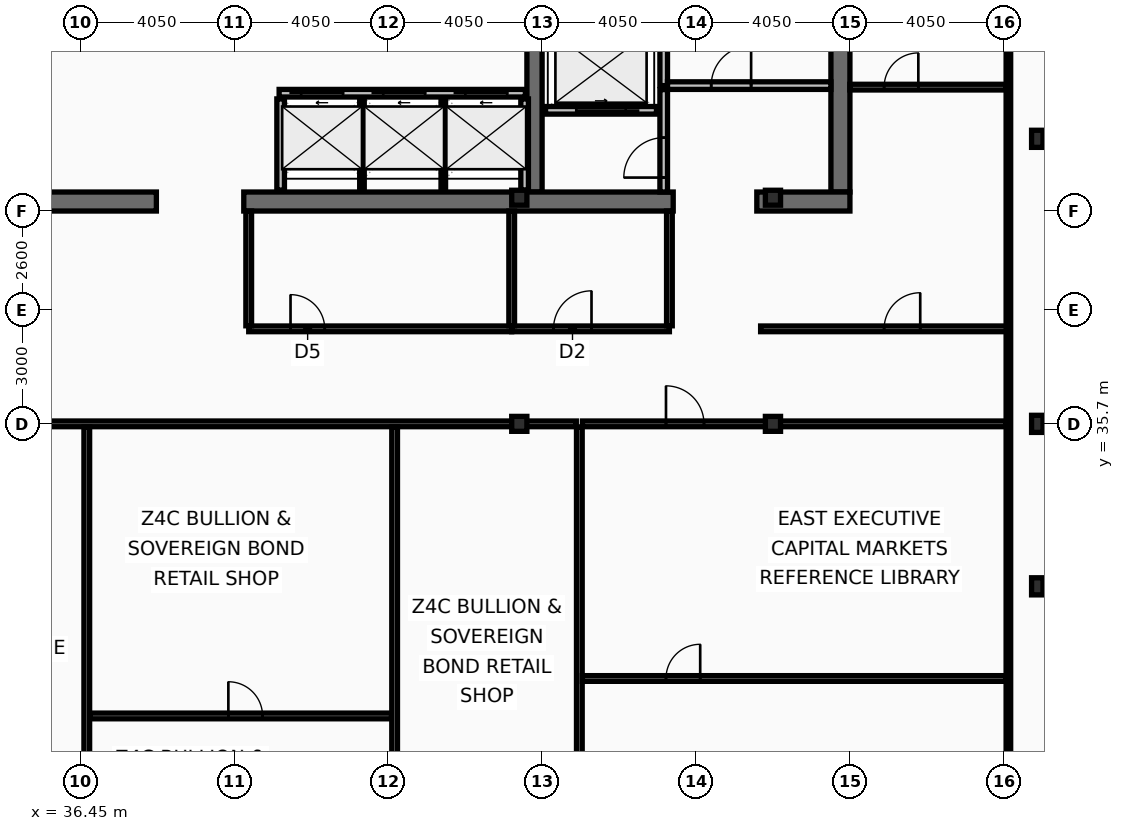
"""IFC4 building model, lengths in metres.
Left out: names, types, materials, properties, quantities, classifications, styles, units other than length and angle.
Written with IfcOpenShell. Run it as: python <this file> out.ifc"""

import sys

from ifc_helpers import new_model, si_unit, direction, frame, frame_2d, origin, origin_2d, place, context, subcontext, project, spatial, rectangle, i_section, extrude, element, fill, save


model = new_model("IFC4")
c1 = context("Model", 3, precision=1e-05, world=origin(), true_north=direction((0.0, 1.0)))
c2 = subcontext(c1, "Body", "Model", "MODEL_VIEW")
j1 = project(units=[si_unit("LENGTHUNIT", "METRE"), si_unit("PLANEANGLEUNIT", "RADIAN")], contexts=[c1])
p1 = place(None, origin())
s1 = spatial("IfcSite", under=j1, at=p1, CompositionType="ELEMENT")
p2 = place(p1, origin())
s2 = spatial("IfcBuilding", under=s1, at=p2, CompositionType="ELEMENT")
p3 = place(p2, frame((0.0, 0.0, 302.2)))
s3 = spatial("IfcBuildingStorey", under=s2, at=p3, CompositionType="ELEMENT", Elevation=302.2)
p4 = place(p3, frame((56.45, 53.2, 0.0), z_axis=(0.0, 0.0, 1.0), x_axis=(0.0, -1.0, 0.0)))
e1 = element("IfcWall", 1, at=p4, inside=s3, PredefinedType="SHEAR", context=c2, shape_type="SweptSolid", body=[
    extrude(rectangle(XDim=11.4, YDim=0.5, at=frame_2d((5.7, 0.0))), origin(), (0.0, 0.0, 1.0), 3.38),
])
p5 = place(p3, frame((48.4, 41.8, 0.0), z_axis=(0.0, 0.0, 1.0), x_axis=(0.0, 1.0, 0.0)))
e2 = element("IfcWall", 2, at=p5, inside=s3, PredefinedType="SHEAR", context=c2, shape_type="SweptSolid", body=[
    extrude(rectangle(XDim=11.4, YDim=0.4, at=frame_2d((5.7, 0.0))), origin(), (0.0, 0.0, 1.0), 3.38),
])
p6 = place(p3, frame((38.45, 41.55, 0.0), z_axis=(0.0, 0.0, 1.0), x_axis=(-1.0, 0.0, 0.0)))
e3 = element("IfcWall", 3, at=p6, inside=s3, PredefinedType="SHEAR", context=c2, shape_type="SweptSolid", body=[
    extrude(rectangle(XDim=3.75, YDim=0.5, at=frame_2d((1.875, 0.0))), origin(), (0.0, 0.0, 1.0), 3.38),
])
p7 = place(p3, frame((52.05, 41.55, 0.0), z_axis=(0.0, 0.0, 1.0), x_axis=(-1.0, 0.0, 0.0)))
e4 = element("IfcWall", 4, at=p7, inside=s3, PredefinedType="SHEAR", context=c2, shape_type="SweptSolid", body=[
    extrude(rectangle(XDim=11.3, YDim=0.5, at=frame_2d((5.65, 0.0))), origin(), (0.0, 0.0, 1.0), 3.38),
])
p8 = place(p3, frame((56.7, 41.55, 0.0), z_axis=(0.0, 0.0, 1.0), x_axis=(-1.0, 0.0, 0.0)))
e5 = element("IfcWall", 5, at=p8, inside=s3, PredefinedType="SHEAR", context=c2, shape_type="SweptSolid", body=[
    extrude(rectangle(XDim=2.45, YDim=0.5, at=frame_2d((1.225, 0.0))), origin(), (0.0, 0.0, 1.0), 3.38),
])
for number, where, z_axis, x_axis in (
    (6, (61.63, 31.425, 0.0), (0.0, 0.0, 1.0), (1.0, 0.0, 0.0)),
    (7, (61.63, 35.7, 0.0), (0.0, 0.0, 1.0), (1.0, 0.0, 0.0)),
    (8, (61.63, 43.2, 0.0), (0.0, 0.0, 1.0), (1.0, 0.0, 0.0)),
):
    element("IfcColumn", number, at=place(p3, frame(where, z_axis=z_axis, x_axis=x_axis)), inside=s3, PredefinedType="COLUMN", context=c2, shape_type="SweptSolid", body=[
        extrude(i_section(OverallWidth=0.3, OverallDepth=0.45, WebThickness=0.014, FlangeThickness=0.026, at=origin_2d()), origin(), (0.0, 0.0, 1.0), 3.6),
    ])
for number, where, z_axis, x_axis in (
    (9, (48.0, 35.7, 0.0), (0.0, 0.0, 1.0), (1.0, 0.0, 0.0)),
    (10, (48.0, 41.65, 0.0), (0.0, 0.0, 1.0), (1.0, 0.0, 0.0)),
    (11, (54.675, 35.7, 0.0), (0.0, 0.0, 1.0), (1.0, 0.0, 0.0)),
    (12, (54.675, 41.65, 0.0), (0.0, 0.0, 1.0), (1.0, 0.0, 0.0)),
):
    element("IfcColumn", number, at=place(p3, frame(where, z_axis=z_axis, x_axis=x_axis)), inside=s3, PredefinedType="COLUMN", context=c2, shape_type="SweptSolid", body=[
        extrude(i_section(OverallWidth=0.399, OverallDepth=0.393, WebThickness=0.023, FlangeThickness=0.037, at=origin_2d()), origin(), (0.0, 0.0, 1.0), 3.6),
    ])
p9 = place(p3, frame((41.68, 44.4, 0.0), z_axis=(0.0, 0.0, 1.0), x_axis=(1.0, 0.0, 0.0)))
e13 = element("IfcWall", 13, at=p9, inside=s3, PredefinedType="PARTITIONING", context=c2, shape_type="SweptSolid", body=[
    extrude(rectangle(XDim=6.48, YDim=0.2, at=frame_2d((3.24, 0.0))), origin(), (0.0, 0.0, 1.0), 3.38),
])
p10 = place(p9, frame((0.58, 0.0, 0.0)))
e14 = element("IfcOpeningElement", 14, at=p10, cuts=e13, PredefinedType="OPENING", context=c2, shape_type="SweptSolid", body=[
    extrude(rectangle(XDim=1.1, YDim=2.18, at=frame_2d((0.55, 1.09))), frame((0.0, 0.11, 0.0), z_axis=(0.0, -1.0, 0.0), x_axis=(1.0, 0.0, 0.0)), (0.0, 0.0, 1.0), 0.22),
])
p11 = place(p9, frame((2.74, 0.0, 0.0)))
e15 = element("IfcOpeningElement", 15, at=p11, cuts=e13, PredefinedType="OPENING", context=c2, shape_type="SweptSolid", body=[
    extrude(rectangle(XDim=1.1, YDim=2.18, at=frame_2d((0.55, 1.09))), frame((0.0, 0.11, 0.0), z_axis=(0.0, -1.0, 0.0), x_axis=(1.0, 0.0, 0.0)), (0.0, 0.0, 1.0), 0.22),
])
p12 = place(p9, frame((4.9, 0.0, 0.0)))
e16 = element("IfcOpeningElement", 16, at=p12, cuts=e13, PredefinedType="OPENING", context=c2, shape_type="SweptSolid", body=[
    extrude(rectangle(XDim=1.1, YDim=2.18, at=frame_2d((0.55, 1.09))), frame((0.0, 0.11, 0.0), z_axis=(0.0, -1.0, 0.0), x_axis=(1.0, 0.0, 0.0)), (0.0, 0.0, 1.0), 0.22),
])
p13 = place(p3, frame((51.61, 43.95, 0.0), z_axis=(0.0, 0.0, 1.0), x_axis=(-1.0, 0.0, 0.0)))
e17 = element("IfcWall", 17, at=p13, inside=s3, PredefinedType="PARTITIONING", context=c2, shape_type="SweptSolid", body=[
    extrude(rectangle(XDim=2.92, YDim=0.2, at=frame_2d((1.46, 0.0))), origin(), (0.0, 0.0, 1.0), 3.38),
])
p14 = place(p13, frame((0.81, 0.0, 0.0)))
e18 = element("IfcOpeningElement", 18, at=p14, cuts=e17, PredefinedType="OPENING", context=c2, shape_type="SweptSolid", body=[
    extrude(rectangle(XDim=1.3, YDim=2.18, at=frame_2d((0.65, 1.09))), frame((0.0, 0.11, 0.0), z_axis=(0.0, -1.0, 0.0), x_axis=(1.0, 0.0, 0.0)), (0.0, 0.0, 1.0), 0.22),
])
p15 = place(p3, frame((51.8, 44.6, 0.0), z_axis=(0.0, 0.0, 1.0), x_axis=(0.0, 1.0, 0.0)))
e19 = element("IfcWall", 19, at=p15, inside=s3, PredefinedType="PARTITIONING", context=c2, shape_type="SweptSolid", body=[
    extrude(rectangle(XDim=4.3, YDim=0.2, at=frame_2d((2.15, 0.0))), origin(), (0.0, 0.0, 1.0), 3.38),
])
p16 = place(p3, frame((51.9, 44.6, 0.0), z_axis=(0.0, 0.0, 1.0), x_axis=(1.0, 0.0, 0.0)))
e20 = element("IfcWall", 20, at=p16, inside=s3, PredefinedType="PARTITIONING", context=c2, shape_type="SweptSolid", body=[
    extrude(rectangle(XDim=4.3, YDim=0.2, at=frame_2d((2.15, 0.0))), origin(), (0.0, 0.0, 1.0), 3.38),
])
p17 = place(p16, frame((1.15, 0.0, 0.0)))
e21 = element("IfcOpeningElement", 21, at=p17, cuts=e20, PredefinedType="OPENING", context=c2, shape_type="SweptSolid", body=[
    extrude(rectangle(XDim=1.05, YDim=2.15, at=frame_2d((0.525, 1.075))), frame((0.0, 0.11, 0.0), z_axis=(0.0, -1.0, 0.0), x_axis=(1.0, 0.0, 0.0)), (0.0, 0.0, 1.0), 0.22),
])
p18 = place(p3, frame((51.8, 41.8, 0.0), z_axis=(0.0, 0.0, 1.0), x_axis=(0.0, 1.0, 0.0)))
e22 = element("IfcWall", 22, at=p18, inside=s3, PredefinedType="PARTITIONING", context=c2, shape_type="SweptSolid", body=[
    extrude(rectangle(XDim=2.695, YDim=0.2, at=frame_2d((1.348, 0.0))), origin(), (0.0, 0.0, 1.0), 3.38),
])
p19 = place(p18, frame((0.38, 0.0, 0.0)))
e23 = element("IfcOpeningElement", 23, at=p19, cuts=e22, PredefinedType="OPENING", context=c2, shape_type="SweptSolid", body=[
    extrude(rectangle(XDim=1.05, YDim=2.15, at=frame_2d((0.525, 1.075))), frame((0.0, 0.11, 0.0), z_axis=(0.0, -1.0, 0.0), x_axis=(1.0, 0.0, 0.0)), (0.0, 0.0, 1.0), 0.22),
])
for number, where, z_axis, x_axis in (
    (24, (41.72, 41.85, 0.0), (0.0, 0.0, 1.0), (0.0, 1.0, 0.0)),
    (25, (48.14, 41.85, 0.0), (0.0, 0.0, 1.0), (0.0, 1.0, 0.0)),
):
    element("IfcWall", number, at=place(p3, frame(where, z_axis=z_axis, x_axis=x_axis)), inside=s3, PredefinedType="PARTITIONING", context=c2, shape_type="SweptSolid", body=[
        extrude(rectangle(XDim=2.4, YDim=0.2, at=frame_2d((1.2, 0.0))), origin(), (0.0, 0.0, 1.0), 3.38),
    ])
for number, where, z_axis, x_axis in (
    (26, (43.86, 41.85, 0.0), (0.0, 0.0, 1.0), (0.0, 1.0, 0.0)),
    (27, (46.0, 41.85, 0.0), (0.0, 0.0, 1.0), (0.0, 1.0, 0.0)),
):
    element("IfcWall", number, at=place(p3, frame(where, z_axis=z_axis, x_axis=x_axis)), inside=s3, PredefinedType="PARTITIONING", context=c2, shape_type="SweptSolid", body=[
        extrude(rectangle(XDim=2.4, YDim=0.12, at=frame_2d((1.2, 0.0))), origin(), (0.0, 0.0, 1.0), 3.38),
    ])
p20 = place(p3, frame((40.88, 38.2, 0.0), z_axis=(0.0, 0.0, 1.0), x_axis=(1.0, 0.0, 0.0)))
e28 = element("IfcWall", 28, at=p20, inside=s3, PredefinedType="PARTITIONING", context=c2, shape_type="SweptSolid", body=[
    extrude(rectangle(XDim=6.92, YDim=0.15, at=frame_2d((3.46, 0.0))), origin(), (0.0, 0.0, 1.0), 2.72),
])
p21 = place(p20, frame((1.1, 0.0, 0.0)))
e29 = element("IfcOpeningElement", 29, at=p21, cuts=e28, PredefinedType="OPENING", context=c2, shape_type="SweptSolid", body=[
    extrude(rectangle(XDim=0.9, YDim=2.05, at=frame_2d((0.45, 1.025))), frame((0.0, 0.085, 0.0), z_axis=(0.0, -1.0, 0.0), x_axis=(1.0, 0.0, 0.0)), (0.0, 0.0, 1.0), 0.17),
])
p22 = place(p3, frame((47.8, 38.2, 0.0), z_axis=(0.0, 0.0, 1.0), x_axis=(1.0, 0.0, 0.0)))
e30 = element("IfcWall", 30, at=p22, inside=s3, PredefinedType="PARTITIONING", context=c2, shape_type="SweptSolid", body=[
    extrude(rectangle(XDim=4.15, YDim=0.15, at=frame_2d((2.075, 0.0))), origin(), (0.0, 0.0, 1.0), 2.72),
])
p23 = place(p22, frame((1.1, 0.0, 0.0)))
e31 = element("IfcOpeningElement", 31, at=p23, cuts=e30, PredefinedType="OPENING", context=c2, shape_type="SweptSolid", body=[
    extrude(rectangle(XDim=1.0, YDim=2.05, at=frame_2d((0.5, 1.025))), frame((0.0, 0.085, 0.0), z_axis=(0.0, -1.0, 0.0), x_axis=(1.0, 0.0, 0.0)), (0.0, 0.0, 1.0), 0.17),
])
p24 = place(p3, frame((40.88, 38.28, 0.0), z_axis=(0.0, 0.0, 1.0), x_axis=(0.0, 1.0, 0.0)))
e32 = element("IfcWall", 32, at=p24, inside=s3, PredefinedType="PARTITIONING", context=c2, shape_type="SweptSolid", body=[
    extrude(rectangle(XDim=3.02, YDim=0.15, at=frame_2d((1.51, 0.0))), origin(), (0.0, 0.0, 1.0), 3.38),
])
p25 = place(p3, frame((47.8, 38.28, 0.0), z_axis=(0.0, 0.0, 1.0), x_axis=(0.0, 1.0, 0.0)))
e33 = element("IfcWall", 33, at=p25, inside=s3, PredefinedType="PARTITIONING", context=c2, shape_type="SweptSolid", body=[
    extrude(rectangle(XDim=3.02, YDim=0.15, at=frame_2d((1.51, 0.0))), origin(), (0.0, 0.0, 1.0), 2.72),
])
p26 = place(p3, frame((51.95, 38.28, 0.0), z_axis=(0.0, 0.0, 1.0), x_axis=(0.0, 1.0, 0.0)))
e34 = element("IfcWall", 34, at=p26, inside=s3, PredefinedType="PARTITIONING", context=c2, shape_type="SweptSolid", body=[
    extrude(rectangle(XDim=3.02, YDim=0.15, at=frame_2d((1.51, 0.0))), origin(), (0.0, 0.0, 1.0), 3.38),
])
p27 = place(p3, frame((54.35, 38.2, 0.0), z_axis=(0.0, 0.0, 1.0), x_axis=(1.0, 0.0, 0.0)))
e35 = element("IfcWall", 35, at=p27, inside=s3, PredefinedType="PARTITIONING", context=c2, shape_type="SweptSolid", body=[
    extrude(rectangle(XDim=6.52, YDim=0.15, at=frame_2d((3.26, 0.0))), origin(), (0.0, 0.0, 1.0), 2.72),
])
p28 = place(p27, frame((3.25, 0.0, 0.0)))
e36 = element("IfcOpeningElement", 36, at=p28, cuts=e35, PredefinedType="OPENING", context=c2, shape_type="SweptSolid", body=[
    extrude(rectangle(XDim=0.95, YDim=2.05, at=frame_2d((0.475, 1.025))), frame((0.0, 0.085, 0.0), z_axis=(0.0, -1.0, 0.0), x_axis=(1.0, 0.0, 0.0)), (0.0, 0.0, 1.0), 0.17),
])
p29 = place(p3, frame((56.7, 44.56, 0.0), z_axis=(0.0, 0.0, 1.0), x_axis=(1.0, 0.0, 0.0)))
e37 = element("IfcWall", 37, at=p29, inside=s3, PredefinedType="PARTITIONING", context=c2, shape_type="SweptSolid", body=[
    extrude(rectangle(XDim=4.105, YDim=0.15, at=frame_2d((2.052, 0.0))), origin(), (0.0, 0.0, 1.0), 2.82),
])
p30 = place(p29, frame((0.9, 0.0, 0.0)))
e38 = element("IfcOpeningElement", 38, at=p30, cuts=e37, PredefinedType="OPENING", context=c2, shape_type="SweptSolid", body=[
    extrude(rectangle(XDim=0.9, YDim=2.05, at=frame_2d((0.45, 1.025))), frame((0.0, 0.085, 0.0), z_axis=(0.0, -1.0, 0.0), x_axis=(1.0, 0.0, 0.0)), (0.0, 0.0, 1.0), 0.17),
])
p31 = place(p3, frame((49.58, 10.665, 0.0), z_axis=(0.0, 0.0, 1.0), x_axis=(0.0, 1.0, 0.0)))
e39 = element("IfcWall", 39, at=p31, inside=s3, PredefinedType="PARTITIONING", context=c2, shape_type="SweptSolid", body=[
    extrude(rectangle(XDim=24.955, YDim=0.15, at=frame_2d((12.478, 0.0))), origin(), (0.0, 0.0, 1.0), 2.97),
])
p32 = place(p31, frame((3.2, 0.0, 0.0)))
e40 = element("IfcOpeningElement", 40, at=p32, cuts=e39, PredefinedType="OPENING", context=c2, shape_type="SweptSolid", body=[
    extrude(rectangle(XDim=1.1, YDim=2.1, at=frame_2d((0.55, 1.05))), frame((0.0, 0.085, 0.0), z_axis=(0.0, -1.0, 0.0), x_axis=(1.0, 0.0, 0.0)), (0.0, 0.0, 1.0), 0.17),
])
p33 = place(p3, frame((24.48, 35.7, 0.0), z_axis=(0.0, 0.0, 1.0), x_axis=(1.0, 0.0, 0.0)))
e41 = element("IfcWall", 41, at=p33, inside=s3, PredefinedType="PARTITIONING", context=c2, shape_type="SweptSolid", body=[
    extrude(rectangle(XDim=25.02, YDim=0.15, at=frame_2d((12.51, 0.0))), origin(), (0.0, 0.0, 1.0), 2.72),
])
p34 = place(p3, frame((49.66, 35.7, 0.0), z_axis=(0.0, 0.0, 1.0), x_axis=(1.0, 0.0, 0.0)))
e42 = element("IfcWall", 42, at=p34, inside=s3, PredefinedType="PARTITIONING", context=c2, shape_type="SweptSolid", body=[
    extrude(rectangle(XDim=11.145, YDim=0.15, at=frame_2d((5.573, 0.0))), origin(), (0.0, 0.0, 1.0), 2.72),
])
p35 = place(p34, frame((2.2, 0.0, 0.0)))
e43 = element("IfcOpeningElement", 43, at=p35, cuts=e42, PredefinedType="OPENING", context=c2, shape_type="SweptSolid", body=[
    extrude(rectangle(XDim=1.0, YDim=2.05, at=frame_2d((0.5, 1.025))), frame((0.0, 0.085, 0.0), z_axis=(0.0, -1.0, 0.0), x_axis=(1.0, 0.0, 0.0)), (0.0, 0.0, 1.0), 0.17),
])
p36 = place(p3, frame((49.66, 29.0, 0.0), z_axis=(0.0, 0.0, 1.0), x_axis=(1.0, 0.0, 0.0)))
e44 = element("IfcWall", 44, at=p36, inside=s3, PredefinedType="PARTITIONING", context=c2, shape_type="SweptSolid", body=[
    extrude(rectangle(XDim=11.145, YDim=0.15, at=frame_2d((5.573, 0.0))), origin(), (0.0, 0.0, 1.0), 2.72),
])
p37 = place(p36, frame((2.2, 0.0, 0.0)))
e45 = element("IfcOpeningElement", 45, at=p37, cuts=e44, PredefinedType="OPENING", context=c2, shape_type="SweptSolid", body=[
    extrude(rectangle(XDim=0.9, YDim=2.05, at=frame_2d((0.45, 1.025))), frame((0.0, 0.085, 0.0), z_axis=(0.0, -1.0, 0.0), x_axis=(1.0, 0.0, 0.0)), (0.0, 0.0, 1.0), 0.17),
])
p38 = place(p3, frame((36.619, 22.785, 0.0), z_axis=(0.0, 0.0, 1.0), x_axis=(0.0, 1.0, 0.0)))
e46 = element("IfcWall", 46, at=p38, inside=s3, PredefinedType="PARTITIONING", context=c2, shape_type="SweptSolid", body=[
    extrude(rectangle(XDim=12.835, YDim=0.15, at=frame_2d((6.417, 0.0))), origin(), (0.0, 0.0, 1.0), 2.97),
])
p39 = place(p3, frame((36.699, 28.014, 0.0), z_axis=(0.0, 0.0, 1.0), x_axis=(1.0, 0.0, 0.0)))
e47 = element("IfcWall", 47, at=p39, inside=s3, PredefinedType="PARTITIONING", context=c2, shape_type="SweptSolid", body=[
    extrude(rectangle(XDim=7.941, YDim=0.15, at=frame_2d((3.97, 0.0))), origin(), (0.0, 0.0, 1.0), 2.72),
])
p40 = place(p39, frame((3.646, 0.0, 0.0)))
e48 = element("IfcOpeningElement", 48, at=p40, cuts=e47, PredefinedType="OPENING", context=c2, shape_type="SweptSolid", body=[
    extrude(rectangle(XDim=0.9, YDim=2.05, at=frame_2d((0.45, 1.025))), frame((0.0, 0.085, 0.0), z_axis=(0.0, -1.0, 0.0), x_axis=(1.0, 0.0, 0.0)), (0.0, 0.0, 1.0), 0.17),
])
p41 = place(p3, frame((44.719, 22.785, 0.0), z_axis=(0.0, 0.0, 1.0), x_axis=(0.0, 1.0, 0.0)))
e49 = element("IfcWall", 49, at=p41, inside=s3, PredefinedType="PARTITIONING", context=c2, shape_type="SweptSolid", body=[
    extrude(rectangle(XDim=12.835, YDim=0.15, at=frame_2d((6.417, 0.0))), origin(), (0.0, 0.0, 1.0), 2.97),
])
p42 = place(p3, frame((60.87, 10.665, 0.0), z_axis=(0.0, 0.0, 1.0), x_axis=(0.0, 1.0, 0.0)))
e50 = element("IfcWall", 50, at=p42, inside=s3, PredefinedType="PARTITIONING", context=c2, shape_type="SweptSolid", body=[
    extrude(rectangle(XDim=42.11, YDim=0.12, at=frame_2d((21.055, 0.0))), origin(), (0.0, 0.0, 1.0), 2.72),
])
p43 = place(p10, origin())
e51 = element("IfcDoor", 51, at=p43, inside=s3, OperationType="SLIDING_TO_LEFT", PredefinedType="DOOR", context=c2, shape_type="SweptSolid", body=[
    extrude(rectangle(XDim=1.1, YDim=2.18, at=frame_2d((0.55, 1.09))), frame((0.0, 0.025, 0.0), z_axis=(0.0, -1.0, 0.0), x_axis=(1.0, 0.0, 0.0)), (0.0, 0.0, 1.0), 0.05),
])
fill(e14, e51)
p44 = place(p11, origin())
e52 = element("IfcDoor", 52, at=p44, inside=s3, OperationType="SLIDING_TO_LEFT", PredefinedType="DOOR", context=c2, shape_type="SweptSolid", body=[
    extrude(rectangle(XDim=1.1, YDim=2.18, at=frame_2d((0.55, 1.09))), frame((0.0, 0.025, 0.0), z_axis=(0.0, -1.0, 0.0), x_axis=(1.0, 0.0, 0.0)), (0.0, 0.0, 1.0), 0.05),
])
fill(e15, e52)
p45 = place(p12, origin())
e53 = element("IfcDoor", 53, at=p45, inside=s3, OperationType="SLIDING_TO_LEFT", PredefinedType="DOOR", context=c2, shape_type="SweptSolid", body=[
    extrude(rectangle(XDim=1.1, YDim=2.18, at=frame_2d((0.55, 1.09))), frame((0.0, 0.025, 0.0), z_axis=(0.0, -1.0, 0.0), x_axis=(1.0, 0.0, 0.0)), (0.0, 0.0, 1.0), 0.05),
])
fill(e16, e53)
p46 = place(p14, origin())
e54 = element("IfcDoor", 54, at=p46, inside=s3, OperationType="SLIDING_TO_LEFT", PredefinedType="DOOR", context=c2, shape_type="SweptSolid", body=[
    extrude(rectangle(XDim=1.3, YDim=2.18, at=frame_2d((0.65, 1.09))), frame((0.0, 0.025, 0.0), z_axis=(0.0, -1.0, 0.0), x_axis=(1.0, 0.0, 0.0)), (0.0, 0.0, 1.0), 0.05),
])
fill(e18, e54)
p47 = place(p17, origin())
e55 = element("IfcDoor", 55, at=p47, inside=s3, OperationType="SINGLE_SWING_RIGHT", PredefinedType="DOOR", context=c2, shape_type="SweptSolid", body=[
    extrude(rectangle(XDim=1.05, YDim=2.15, at=frame_2d((0.525, 1.075))), frame((0.0, 0.025, 0.0), z_axis=(0.0, -1.0, 0.0), x_axis=(1.0, 0.0, 0.0)), (0.0, 0.0, 1.0), 0.05),
])
fill(e21, e55)
p48 = place(p19, origin())
e56 = element("IfcDoor", 56, at=p48, inside=s3, OperationType="SINGLE_SWING_LEFT", PredefinedType="DOOR", context=c2, shape_type="SweptSolid", body=[
    extrude(rectangle(XDim=1.05, YDim=2.15, at=frame_2d((0.525, 1.075))), frame((0.0, 0.025, 0.0), z_axis=(0.0, -1.0, 0.0), x_axis=(1.0, 0.0, 0.0)), (0.0, 0.0, 1.0), 0.05),
])
fill(e23, e56)
p49 = place(p21, origin())
e57 = element("IfcDoor", 57, at=p49, inside=s3, OperationType="SINGLE_SWING_LEFT", PredefinedType="DOOR", context=c2, shape_type="SweptSolid", body=[
    extrude(rectangle(XDim=0.9, YDim=2.05, at=frame_2d((0.45, 1.025))), frame((0.0, 0.025, 0.0), z_axis=(0.0, -1.0, 0.0), x_axis=(1.0, 0.0, 0.0)), (0.0, 0.0, 1.0), 0.05),
])
fill(e29, e57)
p50 = place(p23, origin())
e58 = element("IfcDoor", 58, at=p50, inside=s3, OperationType="SINGLE_SWING_RIGHT", PredefinedType="DOOR", context=c2, shape_type="SweptSolid", body=[
    extrude(rectangle(XDim=1.0, YDim=2.05, at=frame_2d((0.5, 1.025))), frame((0.0, 0.025, 0.0), z_axis=(0.0, -1.0, 0.0), x_axis=(1.0, 0.0, 0.0)), (0.0, 0.0, 1.0), 0.05),
])
fill(e31, e58)
p51 = place(p28, origin())
e59 = element("IfcDoor", 59, at=p51, inside=s3, OperationType="SINGLE_SWING_RIGHT", PredefinedType="DOOR", context=c2, shape_type="SweptSolid", body=[
    extrude(rectangle(XDim=0.95, YDim=2.05, at=frame_2d((0.475, 1.025))), frame((0.0, 0.025, 0.0), z_axis=(0.0, -1.0, 0.0), x_axis=(1.0, 0.0, 0.0)), (0.0, 0.0, 1.0), 0.05),
])
fill(e36, e59)
p52 = place(p30, origin())
e60 = element("IfcDoor", 60, at=p52, inside=s3, OperationType="SINGLE_SWING_RIGHT", PredefinedType="DOOR", context=c2, shape_type="SweptSolid", body=[
    extrude(rectangle(XDim=0.9, YDim=2.05, at=frame_2d((0.45, 1.025))), frame((0.0, 0.025, 0.0), z_axis=(0.0, -1.0, 0.0), x_axis=(1.0, 0.0, 0.0)), (0.0, 0.0, 1.0), 0.05),
])
fill(e38, e60)
p53 = place(p35, origin())
e61 = element("IfcDoor", 61, at=p53, inside=s3, OperationType="SINGLE_SWING_LEFT", PredefinedType="DOOR", context=c2, shape_type="SweptSolid", body=[
    extrude(rectangle(XDim=1.0, YDim=2.05, at=frame_2d((0.5, 1.025))), frame((0.0, 0.025, 0.0), z_axis=(0.0, -1.0, 0.0), x_axis=(1.0, 0.0, 0.0)), (0.0, 0.0, 1.0), 0.05),
])
fill(e43, e61)
p54 = place(p37, origin())
e62 = element("IfcDoor", 62, at=p54, inside=s3, OperationType="SINGLE_SWING_RIGHT", PredefinedType="DOOR", context=c2, shape_type="SweptSolid", body=[
    extrude(rectangle(XDim=0.9, YDim=2.05, at=frame_2d((0.45, 1.025))), frame((0.0, 0.025, 0.0), z_axis=(0.0, -1.0, 0.0), x_axis=(1.0, 0.0, 0.0)), (0.0, 0.0, 1.0), 0.05),
])
fill(e45, e62)
p55 = place(p40, origin())
e63 = element("IfcDoor", 63, at=p55, inside=s3, OperationType="SINGLE_SWING_LEFT", PredefinedType="DOOR", context=c2, shape_type="SweptSolid", body=[
    extrude(rectangle(XDim=0.9, YDim=2.05, at=frame_2d((0.45, 1.025))), frame((0.0, 0.025, 0.0), z_axis=(0.0, -1.0, 0.0), x_axis=(1.0, 0.0, 0.0)), (0.0, 0.0, 1.0), 0.05),
])
fill(e48, e63)
save(model, sys.argv[1])
